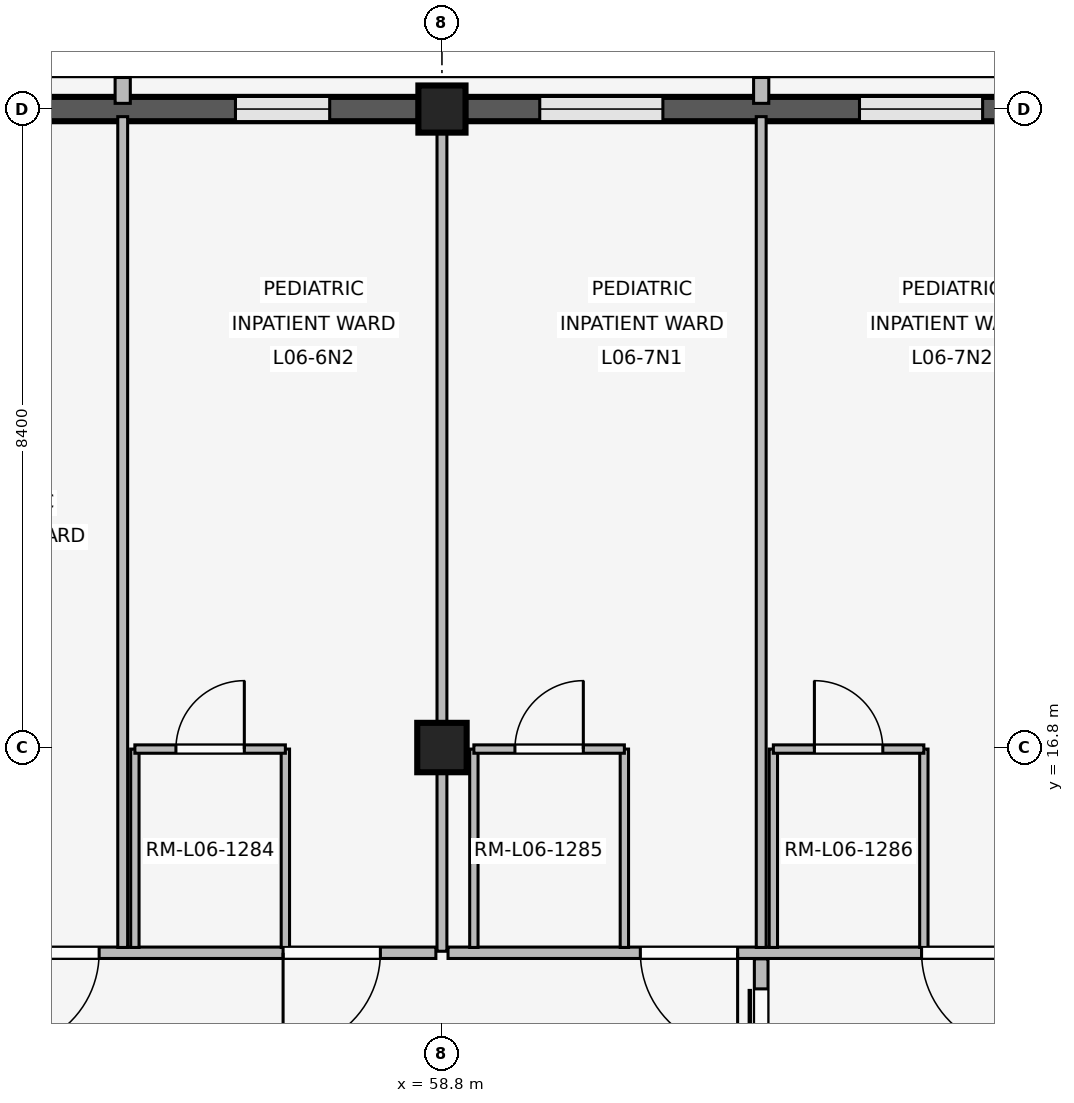
"""IFC4 building model, lengths in metres.
Left out: names, types, materials, properties, quantities, classifications, styles, units other than length and angle.
Written with IfcOpenShell. Run it as: python <this file> out.ifc"""

import sys

from ifc_helpers import new_model, si_unit, direction, frame, frame_2d, origin, origin_2d, place, context, subcontext, project, spatial, rectangle, extrude, element, fill, save


model = new_model("IFC4")
c1 = context("Model", 3, precision=1e-05, world=origin(), true_north=direction((0.0, 1.0)))
c2 = subcontext(c1, "Body", "Model", "MODEL_VIEW")
j1 = project(units=[si_unit("LENGTHUNIT", "METRE"), si_unit("PLANEANGLEUNIT", "RADIAN")], contexts=[c1])
p1 = place(None, origin())
s1 = spatial("IfcSite", under=j1, at=p1, CompositionType="ELEMENT")
p2 = place(p1, origin())
s2 = spatial("IfcBuilding", under=s1, at=p2, CompositionType="ELEMENT")
p3 = place(p2, frame((0.0, 0.0, 24.6)))
s3 = spatial("IfcBuildingStorey", under=s2, at=p3, CompositionType="ELEMENT", Elevation=24.6)
p4 = place(p3, frame((58.8, 16.8, 0.0), z_axis=(0.0, 0.0, 1.0), x_axis=(1.0, 0.0, 0.0)))
e1 = element("IfcColumn", 1, at=p4, inside=s3, PredefinedType="COLUMN", context=c2, shape_type="SweptSolid", body=[
    extrude(rectangle(XDim=0.65, YDim=0.65, at=origin_2d()), origin(), (0.0, 0.0, 1.0), 4.2),
])
p5 = place(p3, frame((58.8, 25.2, 0.0), z_axis=(0.0, 0.0, 1.0), x_axis=(1.0, 0.0, 0.0)))
e2 = element("IfcColumn", 2, at=p5, inside=s3, PredefinedType="COLUMN", context=c2, shape_type="SweptSolid", body=[
    extrude(rectangle(XDim=0.62, YDim=0.62, at=origin_2d()), origin(), (0.0, 0.0, 1.0), 4.2),
])
p6 = place(p3, frame((50.705, 25.2, 0.0), z_axis=(0.0, 0.0, 1.0), x_axis=(1.0, 0.0, 0.0)))
e3 = element("IfcWall", 3, at=p6, inside=s3, PredefinedType="SOLIDWALL", context=c2, shape_type="SweptSolid", body=[
    extrude(rectangle(XDim=7.79, YDim=0.32, at=frame_2d((3.895, 0.0))), origin(), (0.0, 0.0, 1.0), 3.34),
])
p7 = place(p6, frame((1.172, 0.0, 0.85)))
e4 = element("IfcOpeningElement", 4, at=p7, cuts=e3, PredefinedType="OPENING", context=c2, shape_type="SweptSolid", body=[
    extrude(rectangle(XDim=1.24, YDim=1.34, at=frame_2d((0.62, 0.67))), frame((0.0, 0.17, 0.0), z_axis=(0.0, -1.0, 0.0), x_axis=(1.0, 0.0, 0.0)), (0.0, 0.0, 1.0), 0.34),
])
p8 = place(p6, frame((5.378, 0.0, 0.85)))
e5 = element("IfcOpeningElement", 5, at=p8, cuts=e3, PredefinedType="OPENING", context=c2, shape_type="SweptSolid", body=[
    extrude(rectangle(XDim=1.24, YDim=1.34, at=frame_2d((0.62, 0.67))), frame((0.0, 0.17, 0.0), z_axis=(0.0, -1.0, 0.0), x_axis=(1.0, 0.0, 0.0)), (0.0, 0.0, 1.0), 0.34),
])
p9 = place(p3, frame((54.6, 25.275, 0.0), z_axis=(0.0, 0.0, 1.0), x_axis=(0.0, 1.0, 0.0)))
e6 = element("IfcWall", 6, at=p9, inside=s3, PredefinedType="ELEMENTEDWALL", context=c2, shape_type="SweptSolid", body=[
    extrude(rectangle(XDim=0.34, YDim=0.2, at=frame_2d((0.17, 0.0))), origin(), (0.0, 0.0, 1.0), 3.32),
])
p10 = place(p3, frame((59.105, 25.2, 0.0), z_axis=(0.0, 0.0, 1.0), x_axis=(1.0, 0.0, 0.0)))
e7 = element("IfcWall", 7, at=p10, inside=s3, PredefinedType="SOLIDWALL", context=c2, shape_type="SweptSolid", body=[
    extrude(rectangle(XDim=7.79, YDim=0.32, at=frame_2d((3.895, 0.0))), origin(), (0.0, 0.0, 1.0), 3.34),
])
p11 = place(p10, frame((0.982, 0.0, 0.85)))
e8 = element("IfcOpeningElement", 8, at=p11, cuts=e7, PredefinedType="OPENING", context=c2, shape_type="SweptSolid", body=[
    extrude(rectangle(XDim=1.62, YDim=1.52, at=frame_2d((0.81, 0.76))), frame((0.0, 0.17, 0.0), z_axis=(0.0, -1.0, 0.0), x_axis=(1.0, 0.0, 0.0)), (0.0, 0.0, 1.0), 0.34),
])
p12 = place(p10, frame((5.188, 0.0, 0.85)))
e9 = element("IfcOpeningElement", 9, at=p12, cuts=e7, PredefinedType="OPENING", context=c2, shape_type="SweptSolid", body=[
    extrude(rectangle(XDim=1.62, YDim=1.52, at=frame_2d((0.81, 0.76))), frame((0.0, 0.17, 0.0), z_axis=(0.0, -1.0, 0.0), x_axis=(1.0, 0.0, 0.0)), (0.0, 0.0, 1.0), 0.34),
])
p13 = place(p3, frame((63.0, 25.275, 0.0), z_axis=(0.0, 0.0, 1.0), x_axis=(0.0, 1.0, 0.0)))
e10 = element("IfcWall", 10, at=p13, inside=s3, PredefinedType="ELEMENTEDWALL", context=c2, shape_type="SweptSolid", body=[
    extrude(rectangle(XDim=0.34, YDim=0.2, at=frame_2d((0.17, 0.0))), origin(), (0.0, 0.0, 1.0), 3.32),
])
p14 = place(p3, frame((58.72, 14.1, 0.0), z_axis=(0.0, 0.0, 1.0), x_axis=(-1.0, 0.0, 0.0)))
e11 = element("IfcWall", 11, at=p14, inside=s3, PredefinedType="PARTITIONING", context=c2, shape_type="SweptSolid", body=[
    extrude(rectangle(XDim=7.96, YDim=0.15, at=frame_2d((3.98, 0.0))), origin(), (0.0, 0.0, 1.0), 3.32),
])
p15 = place(p14, frame((0.73, 0.0, 0.0)))
e12 = element("IfcOpeningElement", 12, at=p15, cuts=e11, PredefinedType="OPENING", context=c2, shape_type="SweptSolid", body=[
    extrude(rectangle(XDim=1.28, YDim=2.2, at=frame_2d((0.64, 1.1))), frame((0.0, 0.085, 0.0), z_axis=(0.0, -1.0, 0.0), x_axis=(1.0, 0.0, 0.0)), (0.0, 0.0, 1.0), 0.17),
])
p16 = place(p14, frame((4.43, 0.0, 0.0)))
e13 = element("IfcOpeningElement", 13, at=p16, cuts=e11, PredefinedType="OPENING", context=c2, shape_type="SweptSolid", body=[
    extrude(rectangle(XDim=1.28, YDim=2.2, at=frame_2d((0.64, 1.1))), frame((0.0, 0.085, 0.0), z_axis=(0.0, -1.0, 0.0), x_axis=(1.0, 0.0, 0.0)), (0.0, 0.0, 1.0), 0.17),
])
p17 = place(p3, frame((54.6, 14.17, 0.0), z_axis=(0.0, 0.0, 1.0), x_axis=(0.0, 1.0, 0.0)))
e14 = element("IfcWall", 14, at=p17, inside=s3, PredefinedType="PARTITIONING", context=c2, shape_type="SweptSolid", body=[
    extrude(rectangle(XDim=10.93, YDim=0.13, at=frame_2d((5.465, 0.0))), origin(), (0.0, 0.0, 1.0), 3.32),
])
for number, where, z_axis, x_axis in (
    (15, (54.76, 14.17, 0.0), (0.0, 0.0, 1.0), (0.0, 1.0, 0.0)),
    (16, (56.74, 14.17, 0.0), (0.0, 0.0, 1.0), (0.0, 1.0, 0.0)),
):
    element("IfcWall", number, at=place(p3, frame(where, z_axis=z_axis, x_axis=x_axis)), inside=s3, PredefinedType="PARTITIONING", context=c2, shape_type="SweptSolid", body=[
        extrude(rectangle(XDim=2.61, YDim=0.11, at=frame_2d((1.305, 0.0))), origin(), (0.0, 0.0, 1.0), 3.32),
    ])
p18 = place(p3, frame((54.76, 16.78, 0.0), z_axis=(0.0, 0.0, 1.0), x_axis=(1.0, 0.0, 0.0)))
e17 = element("IfcWall", 17, at=p18, inside=s3, PredefinedType="PARTITIONING", context=c2, shape_type="SweptSolid", body=[
    extrude(rectangle(XDim=1.98, YDim=0.11, at=frame_2d((0.99, 0.0))), origin(), (0.0, 0.0, 1.0), 3.32),
])
p19 = place(p18, frame((0.54, 0.0, 0.0)))
e18 = element("IfcOpeningElement", 18, at=p19, cuts=e17, PredefinedType="OPENING", context=c2, shape_type="SweptSolid", body=[
    extrude(rectangle(XDim=0.9, YDim=2.1, at=frame_2d((0.45, 1.05))), frame((0.0, 0.065, 0.0), z_axis=(0.0, -1.0, 0.0), x_axis=(1.0, 0.0, 0.0)), (0.0, 0.0, 1.0), 0.13),
])
p20 = place(p3, frame((58.8, 14.12, 0.0), z_axis=(0.0, 0.0, 1.0), x_axis=(0.0, 1.0, 0.0)))
e19 = element("IfcWall", 19, at=p20, inside=s3, PredefinedType="PARTITIONING", context=c2, shape_type="SweptSolid", body=[
    extrude(rectangle(XDim=10.94, YDim=0.13, at=frame_2d((5.47, 0.0))), origin(), (0.0, 0.0, 1.0), 3.32),
])
p21 = place(p3, frame((67.12, 14.1, 0.0), z_axis=(0.0, 0.0, 1.0), x_axis=(-1.0, 0.0, 0.0)))
e20 = element("IfcWall", 20, at=p21, inside=s3, PredefinedType="PARTITIONING", context=c2, shape_type="SweptSolid", body=[
    extrude(rectangle(XDim=8.24, YDim=0.15, at=frame_2d((4.12, 0.0))), origin(), (0.0, 0.0, 1.0), 3.32),
])
p22 = place(p21, frame((0.73, 0.0, 0.0)))
e21 = element("IfcOpeningElement", 21, at=p22, cuts=e20, PredefinedType="OPENING", context=c2, shape_type="SweptSolid", body=[
    extrude(rectangle(XDim=1.28, YDim=2.2, at=frame_2d((0.64, 1.1))), frame((0.0, 0.085, 0.0), z_axis=(0.0, -1.0, 0.0), x_axis=(1.0, 0.0, 0.0)), (0.0, 0.0, 1.0), 0.17),
])
p23 = place(p21, frame((4.43, 0.0, 0.0)))
e22 = element("IfcOpeningElement", 22, at=p23, cuts=e20, PredefinedType="OPENING", context=c2, shape_type="SweptSolid", body=[
    extrude(rectangle(XDim=1.28, YDim=2.2, at=frame_2d((0.64, 1.1))), frame((0.0, 0.085, 0.0), z_axis=(0.0, -1.0, 0.0), x_axis=(1.0, 0.0, 0.0)), (0.0, 0.0, 1.0), 0.17),
])
p24 = place(p3, frame((63.0, 14.17, 0.0), z_axis=(0.0, 0.0, 1.0), x_axis=(0.0, 1.0, 0.0)))
e23 = element("IfcWall", 23, at=p24, inside=s3, PredefinedType="PARTITIONING", context=c2, shape_type="SweptSolid", body=[
    extrude(rectangle(XDim=10.93, YDim=0.13, at=frame_2d((5.465, 0.0))), origin(), (0.0, 0.0, 1.0), 3.32),
])
for number, where, z_axis, x_axis in (
    (24, (59.22, 14.17, 0.0), (0.0, 0.0, 1.0), (0.0, 1.0, 0.0)),
    (25, (61.2, 14.17, 0.0), (0.0, 0.0, 1.0), (0.0, 1.0, 0.0)),
):
    element("IfcWall", number, at=place(p3, frame(where, z_axis=z_axis, x_axis=x_axis)), inside=s3, PredefinedType="PARTITIONING", context=c2, shape_type="SweptSolid", body=[
        extrude(rectangle(XDim=2.61, YDim=0.11, at=frame_2d((1.305, 0.0))), origin(), (0.0, 0.0, 1.0), 3.32),
    ])
p25 = place(p3, frame((59.22, 16.78, 0.0), z_axis=(0.0, 0.0, 1.0), x_axis=(1.0, 0.0, 0.0)))
e26 = element("IfcWall", 26, at=p25, inside=s3, PredefinedType="PARTITIONING", context=c2, shape_type="SweptSolid", body=[
    extrude(rectangle(XDim=1.98, YDim=0.11, at=frame_2d((0.99, 0.0))), origin(), (0.0, 0.0, 1.0), 3.32),
])
p26 = place(p25, frame((0.54, 0.0, 0.0)))
e27 = element("IfcOpeningElement", 27, at=p26, cuts=e26, PredefinedType="OPENING", context=c2, shape_type="SweptSolid", body=[
    extrude(rectangle(XDim=0.9, YDim=2.1, at=frame_2d((0.45, 1.05))), frame((0.0, 0.065, 0.0), z_axis=(0.0, -1.0, 0.0), x_axis=(1.0, 0.0, 0.0)), (0.0, 0.0, 1.0), 0.13),
])
for number, where, z_axis, x_axis in (
    (28, (63.16, 14.17, 0.0), (0.0, 0.0, 1.0), (0.0, 1.0, 0.0)),
    (29, (65.14, 14.17, 0.0), (0.0, 0.0, 1.0), (0.0, 1.0, 0.0)),
):
    element("IfcWall", number, at=place(p3, frame(where, z_axis=z_axis, x_axis=x_axis)), inside=s3, PredefinedType="PARTITIONING", context=c2, shape_type="SweptSolid", body=[
        extrude(rectangle(XDim=2.61, YDim=0.11, at=frame_2d((1.305, 0.0))), origin(), (0.0, 0.0, 1.0), 3.32),
    ])
p27 = place(p3, frame((63.16, 16.78, 0.0), z_axis=(0.0, 0.0, 1.0), x_axis=(1.0, 0.0, 0.0)))
e30 = element("IfcWall", 30, at=p27, inside=s3, PredefinedType="PARTITIONING", context=c2, shape_type="SweptSolid", body=[
    extrude(rectangle(XDim=1.98, YDim=0.11, at=frame_2d((0.99, 0.0))), origin(), (0.0, 0.0, 1.0), 3.32),
])
p28 = place(p27, frame((0.54, 0.0, 0.0)))
e31 = element("IfcOpeningElement", 31, at=p28, cuts=e30, PredefinedType="OPENING", context=c2, shape_type="SweptSolid", body=[
    extrude(rectangle(XDim=0.9, YDim=2.1, at=frame_2d((0.45, 1.05))), frame((0.0, 0.065, 0.0), z_axis=(0.0, -1.0, 0.0), x_axis=(1.0, 0.0, 0.0)), (0.0, 0.0, 1.0), 0.13),
])
p29 = place(p3, frame((63.0, 11.18, 0.0), z_axis=(0.0, 0.0, 1.0), x_axis=(0.0, 1.0, 0.0)))
e32 = element("IfcWall", 32, at=p29, inside=s3, PredefinedType="PARTITIONING", context=c2, shape_type="SweptSolid", body=[
    extrude(rectangle(XDim=2.84, YDim=0.18, at=frame_2d((1.42, 0.0))), origin(), (0.0, 0.0, 1.0), 3.32),
])
p30 = place(p29, frame((0.395, 0.0, 0.0)))
e33 = element("IfcOpeningElement", 33, at=p30, cuts=e32, PredefinedType="OPENING", context=c2, shape_type="SweptSolid", body=[
    extrude(rectangle(XDim=2.05, YDim=2.35, at=frame_2d((1.025, 1.175))), frame((0.0, 0.1, 0.0), z_axis=(0.0, -1.0, 0.0), x_axis=(1.0, 0.0, 0.0)), (0.0, 0.0, 1.0), 0.2),
])
p31 = place(p8, origin())
e34 = element("IfcWindow", 34, at=p31, inside=s3, PartitioningType="SINGLE_PANEL", PredefinedType="WINDOW", context=c2, shape_type="SweptSolid", body=[
    extrude(rectangle(XDim=1.24, YDim=1.34, at=frame_2d((0.62, 0.67))), frame((0.0, 0.03, 0.0), z_axis=(0.0, -1.0, 0.0), x_axis=(1.0, 0.0, 0.0)), (0.0, 0.0, 1.0), 0.06),
])
fill(e5, e34)
p32 = place(p11, origin())
e35 = element("IfcWindow", 35, at=p32, inside=s3, PartitioningType="SINGLE_PANEL", PredefinedType="WINDOW", context=c2, shape_type="SweptSolid", body=[
    extrude(rectangle(XDim=1.62, YDim=1.52, at=frame_2d((0.81, 0.76))), frame((0.0, 0.03, 0.0), z_axis=(0.0, -1.0, 0.0), x_axis=(1.0, 0.0, 0.0)), (0.0, 0.0, 1.0), 0.06),
])
fill(e8, e35)
p33 = place(p12, origin())
e36 = element("IfcWindow", 36, at=p33, inside=s3, PartitioningType="SINGLE_PANEL", PredefinedType="WINDOW", context=c2, shape_type="SweptSolid", body=[
    extrude(rectangle(XDim=1.62, YDim=1.52, at=frame_2d((0.81, 0.76))), frame((0.0, 0.03, 0.0), z_axis=(0.0, -1.0, 0.0), x_axis=(1.0, 0.0, 0.0)), (0.0, 0.0, 1.0), 0.06),
])
fill(e9, e36)
p34 = place(p15, origin())
e37 = element("IfcDoor", 37, at=p34, inside=s3, OperationType="SINGLE_SWING_RIGHT", PredefinedType="DOOR", context=c2, shape_type="SweptSolid", body=[
    extrude(rectangle(XDim=1.28, YDim=2.2, at=frame_2d((0.64, 1.1))), frame((0.0, 0.025, 0.0), z_axis=(0.0, -1.0, 0.0), x_axis=(1.0, 0.0, 0.0)), (0.0, 0.0, 1.0), 0.05),
])
fill(e12, e37)
p35 = place(p16, origin())
e38 = element("IfcDoor", 38, at=p35, inside=s3, OperationType="SINGLE_SWING_RIGHT", PredefinedType="DOOR", context=c2, shape_type="SweptSolid", body=[
    extrude(rectangle(XDim=1.28, YDim=2.2, at=frame_2d((0.64, 1.1))), frame((0.0, 0.025, 0.0), z_axis=(0.0, -1.0, 0.0), x_axis=(1.0, 0.0, 0.0)), (0.0, 0.0, 1.0), 0.05),
])
fill(e13, e38)
p36 = place(p19, origin())
e39 = element("IfcDoor", 39, at=p36, inside=s3, OperationType="SINGLE_SWING_RIGHT", PredefinedType="DOOR", context=c2, shape_type="SweptSolid", body=[
    extrude(rectangle(XDim=0.9, YDim=2.1, at=frame_2d((0.45, 1.05))), frame((0.0, 0.025, 0.0), z_axis=(0.0, -1.0, 0.0), x_axis=(1.0, 0.0, 0.0)), (0.0, 0.0, 1.0), 0.05),
])
fill(e18, e39)
p37 = place(p22, origin())
e40 = element("IfcDoor", 40, at=p37, inside=s3, OperationType="SINGLE_SWING_LEFT", PredefinedType="DOOR", context=c2, shape_type="SweptSolid", body=[
    extrude(rectangle(XDim=1.28, YDim=2.2, at=frame_2d((0.64, 1.1))), frame((0.0, 0.025, 0.0), z_axis=(0.0, -1.0, 0.0), x_axis=(1.0, 0.0, 0.0)), (0.0, 0.0, 1.0), 0.05),
])
fill(e21, e40)
p38 = place(p23, origin())
e41 = element("IfcDoor", 41, at=p38, inside=s3, OperationType="SINGLE_SWING_LEFT", PredefinedType="DOOR", context=c2, shape_type="SweptSolid", body=[
    extrude(rectangle(XDim=1.28, YDim=2.2, at=frame_2d((0.64, 1.1))), frame((0.0, 0.025, 0.0), z_axis=(0.0, -1.0, 0.0), x_axis=(1.0, 0.0, 0.0)), (0.0, 0.0, 1.0), 0.05),
])
fill(e22, e41)
p39 = place(p26, origin())
e42 = element("IfcDoor", 42, at=p39, inside=s3, OperationType="SINGLE_SWING_RIGHT", PredefinedType="DOOR", context=c2, shape_type="SweptSolid", body=[
    extrude(rectangle(XDim=0.9, YDim=2.1, at=frame_2d((0.45, 1.05))), frame((0.0, 0.025, 0.0), z_axis=(0.0, -1.0, 0.0), x_axis=(1.0, 0.0, 0.0)), (0.0, 0.0, 1.0), 0.05),
])
fill(e27, e42)
p40 = place(p28, origin())
e43 = element("IfcDoor", 43, at=p40, inside=s3, OperationType="SINGLE_SWING_LEFT", PredefinedType="DOOR", context=c2, shape_type="SweptSolid", body=[
    extrude(rectangle(XDim=0.9, YDim=2.1, at=frame_2d((0.45, 1.05))), frame((0.0, 0.025, 0.0), z_axis=(0.0, -1.0, 0.0), x_axis=(1.0, 0.0, 0.0)), (0.0, 0.0, 1.0), 0.05),
])
fill(e31, e43)
p41 = place(p30, origin())
e44 = element("IfcDoor", 44, at=p41, inside=s3, OperationType="SLIDING_TO_LEFT", PredefinedType="DOOR", context=c2, shape_type="SweptSolid", body=[
    extrude(rectangle(XDim=2.05, YDim=2.35, at=frame_2d((1.025, 1.175))), frame((0.0, 0.025, 0.0), z_axis=(0.0, -1.0, 0.0), x_axis=(1.0, 0.0, 0.0)), (0.0, 0.0, 1.0), 0.05),
])
fill(e33, e44)
save(model, sys.argv[1])
